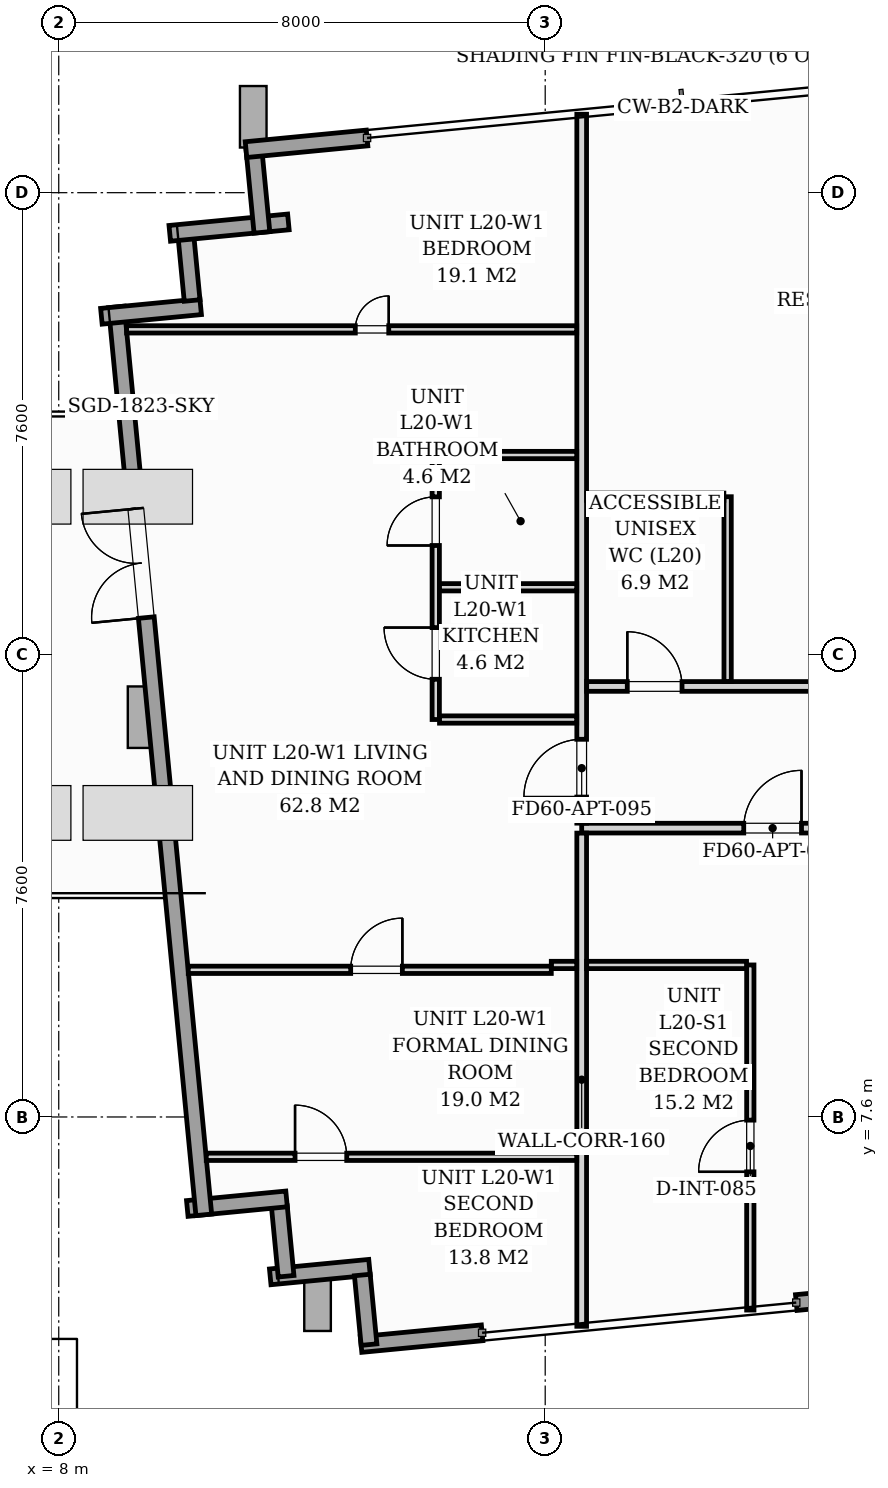
"""IFC4 building model, lengths in metres.
Left out: names, types, materials, properties, quantities, classifications, styles, units other than length and angle.
Written with IfcOpenShell. Run it as: python <this file> out.ifc"""

import sys

from ifc_helpers import new_model, si_unit, direction, frame, frame_2d, origin, origin_2d, place, context, subcontext, project, spatial, rectangle, i_section, extrude, source, transform, mapped, element, fill, save


model = new_model("IFC4")
c1 = context("Model", 3, precision=1e-05, world=origin(), true_north=direction((0.0, 1.0)))
c2 = subcontext(c1, "Body", "Model", "MODEL_VIEW")
j1 = project(units=[si_unit("LENGTHUNIT", "METRE"), si_unit("PLANEANGLEUNIT", "RADIAN")], contexts=[c1])
p1 = place(None, origin())
s1 = spatial("IfcSite", under=j1, at=p1, CompositionType="ELEMENT")
p2 = place(p1, origin())
s2 = spatial("IfcBuilding", under=s1, at=p2, CompositionType="ELEMENT")
p3 = place(p2, frame((0.0, 0.0, 72.6)))
s3 = spatial("IfcBuildingStorey", under=s2, at=p3, CompositionType="ELEMENT", Elevation=72.6)
m1 = source(origin(), c2, "Body", "SweptSolid", [
    extrude(i_section(OverallWidth=0.438, OverallDepth=1.011, WebThickness=0.041, FlangeThickness=0.074, FilletRadius=0.024, at=origin_2d()), origin(), (0.0, 0.0, 1.0), 5.085),
])
p4 = place(p3, frame((11.735, 4.458, 0.108), z_axis=(0.428528444191, 0.106003899258, 0.897288440727), x_axis=(-0.871034557512, -0.215465415974, 0.44144473509)))
e1 = element("IfcColumn", 1, at=p4, inside=s3, PredefinedType="COLUMN", context=c2, shape_type="MappedRepresentation", body=[
    mapped(m1, transform((0.0, 0.0, 0.0), scale=1.0)),
])
m2 = source(origin(), c2, "Body", "SweptSolid", [
    extrude(i_section(OverallWidth=0.438, OverallDepth=1.011, WebThickness=0.041, FlangeThickness=0.074, FilletRadius=0.024, at=origin_2d()), origin(), (0.0, 0.0, 1.0), 5.118),
])
p5 = place(p3, frame((10.871, 24.498, 0.112), z_axis=(0.267775773109, -0.368102238608, 0.890391418011), x_axis=(-0.523786256777, 0.720031134382, 0.455195697181)))
e2 = element("IfcColumn", 2, at=p5, inside=s3, PredefinedType="COLUMN", context=c2, shape_type="MappedRepresentation", body=[
    mapped(m2, transform((0.0, 0.0, 0.0), scale=1.0)),
])
m3 = source(origin(), c2, "Body", "SweptSolid", [
    extrude(i_section(OverallWidth=0.438, OverallDepth=1.011, WebThickness=0.041, FlangeThickness=0.074, FilletRadius=0.024, at=origin_2d()), origin(), (0.0, 0.0, 1.0), 4.984),
])
p6 = place(p3, frame((8.924, 14.364, 0.098), z_axis=(0.359033601049, -0.157741601225, 0.919898070745), x_axis=(-0.842198044788, 0.370020153393, 0.392157544157)))
e3 = element("IfcColumn", 3, at=p6, inside=s3, PredefinedType="COLUMN", context=c2, shape_type="MappedRepresentation", body=[
    mapped(m3, transform((0.0, 0.0, 0.0), scale=1.0)),
])
p7 = place(p3, frame((13.111, 5.128, 0.0), z_axis=(0.0, 0.0, 1.0), x_axis=(-0.995393194909, -0.095876939504, 0.0)))
e4 = element("IfcWall", 4, at=p7, inside=s3, PredefinedType="STANDARD", context=c2, shape_type="SweptSolid", body=[
    extrude(rectangle(XDim=1.64, YDim=0.26, at=frame_2d((0.82, 0.0))), origin(), (0.0, 0.0, 1.0), 4.78),
])
p8 = place(p3, frame((11.739, 4.981, 0.0), z_axis=(0.0, 0.0, 1.0), x_axis=(-0.09576095695, 0.995404359607, 0.0)))
e5 = element("IfcWall", 5, at=p8, inside=s3, PredefinedType="STANDARD", context=c2, shape_type="SweptSolid", body=[
    extrude(rectangle(XDim=1.15, YDim=0.26, at=frame_2d((0.575, 0.0))), origin(), (0.0, 0.0, 1.0), 4.78),
])
p9 = place(p3, frame((11.747, 6.252, 0.0), z_axis=(0.0, 0.0, 1.0), x_axis=(-0.995394563142, -0.095862733462, 0.0)))
e6 = element("IfcWall", 6, at=p9, inside=s3, PredefinedType="STANDARD", context=c2, shape_type="SweptSolid", body=[
    extrude(rectangle(XDim=1.64, YDim=0.26, at=frame_2d((0.82, 0.0))), origin(), (0.0, 0.0, 1.0), 4.78),
])
p10 = place(p3, frame((10.385, 5.991, 0.0), z_axis=(0.0, 0.0, 1.0), x_axis=(-0.095848242264, 0.995395958629, 0.0)))
e7 = element("IfcWall", 7, at=p10, inside=s3, PredefinedType="STANDARD", context=c2, shape_type="SweptSolid", body=[
    extrude(rectangle(XDim=15.0, YDim=0.26, at=frame_2d((7.5, 0.0))), origin(), (0.0, 0.0, 1.0), 4.78),
])
p11 = place(p10, frame((9.867, 0.0, 0.0)))
e8 = element("IfcOpeningElement", 8, at=p11, cuts=e7, PredefinedType="OPENING", context=c2, shape_type="SweptSolid", body=[
    extrude(rectangle(XDim=1.8, YDim=2.1, at=frame_2d((0.9, 1.05))), frame((0.0, 0.14, 0.0), z_axis=(0.0, -1.0, 0.0), x_axis=(1.0, 0.0, 0.0)), (0.0, 0.0, 1.0), 0.28),
])
p12 = place(p3, frame((8.701, 20.767, 0.0), z_axis=(0.0, 0.0, 1.0), x_axis=(0.995394563142, 0.095862733462, 0.0)))
e9 = element("IfcWall", 9, at=p12, inside=s3, PredefinedType="STANDARD", context=c2, shape_type="SweptSolid", body=[
    extrude(rectangle(XDim=1.64, YDim=0.26, at=frame_2d((0.82, 0.0))), origin(), (0.0, 0.0, 1.0), 4.78),
])
p13 = place(p3, frame((10.193, 21.027, 0.0), z_axis=(0.0, 0.0, 1.0), x_axis=(-0.095740721699, 0.995406306092, 0.0)))
e10 = element("IfcWall", 10, at=p13, inside=s3, PredefinedType="STANDARD", context=c2, shape_type="SweptSolid", body=[
    extrude(rectangle(XDim=1.15, YDim=0.26, at=frame_2d((0.575, 0.0))), origin(), (0.0, 0.0, 1.0), 4.78),
])
p14 = place(p3, frame((9.826, 22.131, 0.0), z_axis=(0.0, 0.0, 1.0), x_axis=(0.995400351379, 0.095802612041, 0.0)))
e11 = element("IfcWall", 11, at=p14, inside=s3, PredefinedType="STANDARD", context=c2, shape_type="SweptSolid", body=[
    extrude(rectangle(XDim=1.96, YDim=0.26, at=frame_2d((0.98, 0.0))), origin(), (0.0, 0.0, 1.0), 4.78),
])
p15 = place(p3, frame((11.341, 22.147, 0.0), z_axis=(0.0, 0.0, 1.0), x_axis=(-0.09589913835, 0.995391056452, 0.0)))
e12 = element("IfcWall", 12, at=p15, inside=s3, PredefinedType="STANDARD", context=c2, shape_type="SweptSolid", body=[
    extrude(rectangle(XDim=1.395, YDim=0.26, at=frame_2d((0.698, 0.0))), origin(), (0.0, 0.0, 1.0), 4.78),
])
p16 = place(p3, frame((11.08, 23.508, 0.0), z_axis=(0.0, 0.0, 1.0), x_axis=(0.995398960025, 0.095817067274, 0.0)))
e13 = element("IfcWall", 13, at=p16, inside=s3, PredefinedType="STANDARD", context=c2, shape_type="SweptSolid", body=[
    extrude(rectangle(XDim=2.0, YDim=0.26, at=frame_2d((1.0, 0.0))), origin(), (0.0, 0.0, 1.0), 4.78),
])
p17 = place(p3, frame((28.002, 5.306, 0.0), z_axis=(0.0, 0.0, 1.0), x_axis=(-0.9953942011, -0.09586649267, 0.0)))
e14 = element("IfcWall", 14, at=p17, inside=s3, PredefinedType="STANDARD", context=c2, shape_type="SweptSolid", body=[
    extrude(rectangle(XDim=7.91, YDim=0.26, at=frame_2d((3.955, 0.0))), origin(), (0.0, 0.0, 1.0), 4.78),
])
p18 = place(p3, frame((14.962, 4.051, 0.0), z_axis=(0.0, 0.0, 1.0), x_axis=(-0.995397839199, -0.095828710298, 0.0)))
e15 = element("IfcWall", 15, at=p18, inside=s3, PredefinedType="STANDARD", context=c2, shape_type="SweptSolid", body=[
    extrude(rectangle(XDim=2.0, YDim=0.26, at=frame_2d((1.0, 0.0))), origin(), (0.0, 0.0, 1.0), 4.78),
])
p19 = place(p3, frame((13.103, 3.856, 0.0), z_axis=(0.0, 0.0, 1.0), x_axis=(-0.095951054827, 0.995386053287, 0.0)))
e16 = element("IfcWall", 16, at=p19, inside=s3, PredefinedType="STANDARD", context=c2, shape_type="SweptSolid", body=[
    extrude(rectangle(XDim=1.15, YDim=0.26, at=frame_2d((0.575, 0.0))), origin(), (0.0, 0.0, 1.0), 4.78),
])
p20 = place(p3, frame((16.6, 12.35, 0.0), z_axis=(0.0, 0.0, 1.0), x_axis=(1.0, 0.0, 0.0)))
e17 = element("IfcWall", 17, at=p20, inside=s3, PredefinedType="PARTITIONING", context=c2, shape_type="SweptSolid", body=[
    extrude(rectangle(XDim=37.6, YDim=0.16, at=frame_2d((18.8, 0.0))), origin(), (0.0, 0.0, 1.0), 4.78),
])
p21 = place(p20, frame((2.665, 0.0, 0.0)))
e18 = element("IfcOpeningElement", 18, at=p21, cuts=e17, PredefinedType="OPENING", context=c2, shape_type="SweptSolid", body=[
    extrude(rectangle(XDim=0.95, YDim=2.06, at=frame_2d((0.475, 1.03))), frame((0.0, 0.09, 0.0), z_axis=(0.0, -1.0, 0.0), x_axis=(1.0, 0.0, 0.0)), (0.0, 0.0, 1.0), 0.18),
])
p22 = place(p20, frame((26.146, 0.0, 0.0)))
e19 = element("IfcOpeningElement", 19, at=p22, cuts=e17, PredefinedType="OPENING", context=c2, shape_type="SweptSolid", body=[
    extrude(rectangle(XDim=0.95, YDim=2.06, at=frame_2d((0.475, 1.03))), frame((0.0, 0.09, 0.0), z_axis=(0.0, -1.0, 0.0), x_axis=(1.0, 0.0, 0.0)), (0.0, 0.0, 1.0), 0.18),
])
p23 = place(p3, frame((16.6, 4.158, 0.0), z_axis=(0.0, 0.0, 1.0), x_axis=(0.0, 1.0, 0.0)))
e20 = element("IfcWall", 20, at=p23, inside=s3, PredefinedType="PARTITIONING", context=c2, shape_type="SweptSolid", body=[
    extrude(rectangle(XDim=8.11, YDim=0.16, at=frame_2d((4.055, 0.0))), origin(), (0.0, 0.0, 1.0), 4.78),
])
p24 = place(p3, frame((16.6, 12.432, 0.0), z_axis=(0.0, 0.0, 1.0), x_axis=(0.0, 1.0, 0.0)))
e21 = element("IfcWall", 21, at=p24, inside=s3, PredefinedType="PARTITIONING", context=c2, shape_type="SweptSolid", body=[
    extrude(rectangle(XDim=11.658, YDim=0.16, at=frame_2d((5.829, 0.0))), origin(), (0.0, 0.0, 1.0), 4.78),
])
p25 = place(p24, frame((0.429, 0.0, 0.0)))
e22 = element("IfcOpeningElement", 22, at=p25, cuts=e21, PredefinedType="OPENING", context=c2, shape_type="SweptSolid", body=[
    extrude(rectangle(XDim=0.95, YDim=2.06, at=frame_2d((0.475, 1.03))), frame((0.0, 0.09, 0.0), z_axis=(0.0, -1.0, 0.0), x_axis=(1.0, 0.0, 0.0)), (0.0, 0.0, 1.0), 0.18),
])
p26 = place(p3, frame((19.373, 4.425, 0.0), z_axis=(0.0, 0.0, 1.0), x_axis=(0.0, 1.0, 0.0)))
e23 = element("IfcWall", 23, at=p26, inside=s3, PredefinedType="PARTITIONING", context=c2, shape_type="SweptSolid", body=[
    extrude(rectangle(XDim=5.675, YDim=0.12, at=frame_2d((2.837, 0.0))), origin(), (0.0, 0.0, 1.0), 4.78),
])
p27 = place(p26, frame((2.273, 0.0, 0.0)))
e24 = element("IfcOpeningElement", 24, at=p27, cuts=e23, PredefinedType="OPENING", context=c2, shape_type="SweptSolid", body=[
    extrude(rectangle(XDim=0.85, YDim=2.05, at=frame_2d((0.425, 1.025))), frame((0.0, 0.07, 0.0), z_axis=(0.0, -1.0, 0.0), x_axis=(1.0, 0.0, 0.0)), (0.0, 0.0, 1.0), 0.14),
])
p28 = place(p3, frame((16.1, 10.1, 0.0), z_axis=(0.0, 0.0, 1.0), x_axis=(1.0, 0.0, 0.0)))
e25 = element("IfcWall", 25, at=p28, inside=s3, PredefinedType="PARTITIONING", context=c2, shape_type="SweptSolid", body=[
    extrude(rectangle(XDim=0.418, YDim=0.12, at=frame_2d((0.209, 0.0))), origin(), (0.0, 0.0, 1.0), 4.78),
])
p29 = place(p3, frame((16.682, 10.1, 0.0), z_axis=(0.0, 0.0, 1.0), x_axis=(1.0, 0.0, 0.0)))
e26 = element("IfcWall", 26, at=p29, inside=s3, PredefinedType="PARTITIONING", context=c2, shape_type="SweptSolid", body=[
    extrude(rectangle(XDim=2.629, YDim=0.12, at=frame_2d((1.314, 0.0))), origin(), (0.0, 0.0, 1.0), 4.78),
])
p30 = place(p3, frame((14.2, 14.136, 0.0), z_axis=(0.0, 0.0, 1.0), x_axis=(0.0, 1.0, 0.0)))
e27 = element("IfcWall", 27, at=p30, inside=s3, PredefinedType="PARTITIONING", context=c2, shape_type="SweptSolid", body=[
    extrude(rectangle(XDim=4.35, YDim=0.12, at=frame_2d((2.175, 0.0))), origin(), (0.0, 0.0, 1.0), 4.78),
])
p31 = place(p30, frame((0.662, 0.0, 0.0)))
e28 = element("IfcOpeningElement", 28, at=p31, cuts=e27, PredefinedType="OPENING", context=c2, shape_type="SweptSolid", body=[
    extrude(rectangle(XDim=0.85, YDim=2.05, at=frame_2d((0.425, 1.025))), frame((0.0, 0.07, 0.0), z_axis=(0.0, -1.0, 0.0), x_axis=(1.0, 0.0, 0.0)), (0.0, 0.0, 1.0), 0.14),
])
p32 = place(p30, frame((2.862, 0.0, 0.0)))
e29 = element("IfcOpeningElement", 29, at=p32, cuts=e27, PredefinedType="OPENING", context=c2, shape_type="SweptSolid", body=[
    extrude(rectangle(XDim=0.8, YDim=2.02, at=frame_2d((0.4, 1.01))), frame((0.0, 0.07, 0.0), z_axis=(0.0, -1.0, 0.0), x_axis=(1.0, 0.0, 0.0)), (0.0, 0.0, 1.0), 0.14),
])
for number, where, z_axis, x_axis in (
    (30, (14.262, 16.311, 0.0), (0.0, 0.0, 1.0), (1.0, 0.0, 0.0)),
    (31, (14.262, 14.136, 0.0), (0.0, 0.0, 1.0), (1.0, 0.0, 0.0)),
    (32, (14.262, 18.486, 0.0), (0.0, 0.0, 1.0), (1.0, 0.0, 0.0)),
):
    element("IfcWall", number, at=place(p3, frame(where, z_axis=z_axis, x_axis=x_axis)), inside=s3, PredefinedType="PARTITIONING", context=c2, shape_type="SweptSolid", body=[
        extrude(rectangle(XDim=2.256, YDim=0.12, at=frame_2d((1.128, 0.0))), origin(), (0.0, 0.0, 1.0), 4.78),
    ])
p33 = place(p3, frame((9.116, 20.552, 0.0), z_axis=(0.0, 0.0, 1.0), x_axis=(1.0, 0.0, 0.0)))
e33 = element("IfcWall", 33, at=p33, inside=s3, PredefinedType="PARTITIONING", context=c2, shape_type="SweptSolid", body=[
    extrude(rectangle(XDim=7.402, YDim=0.12, at=frame_2d((3.701, 0.0))), origin(), (0.0, 0.0, 1.0), 4.78),
])
p34 = place(p33, frame((3.761, 0.0, 0.0)))
e34 = element("IfcOpeningElement", 34, at=p34, cuts=e33, PredefinedType="OPENING", context=c2, shape_type="SweptSolid", body=[
    extrude(rectangle(XDim=0.55, YDim=2.0, at=frame_2d((0.275, 1.0))), frame((0.0, 0.07, 0.0), z_axis=(0.0, -1.0, 0.0), x_axis=(1.0, 0.0, 0.0)), (0.0, 0.0, 1.0), 0.14),
])
p35 = place(p3, frame((10.426, 6.945, 0.0), z_axis=(0.0, 0.0, 1.0), x_axis=(1.0, 0.0, 0.0)))
e35 = element("IfcWall", 35, at=p35, inside=s3, PredefinedType="PARTITIONING", context=c2, shape_type="SweptSolid", body=[
    extrude(rectangle(XDim=6.092, YDim=0.12, at=frame_2d((3.046, 0.0))), origin(), (0.0, 0.0, 1.0), 4.78),
])
p36 = place(p35, frame((1.46, 0.0, 0.0)))
e36 = element("IfcOpeningElement", 36, at=p36, cuts=e35, PredefinedType="OPENING", context=c2, shape_type="SweptSolid", body=[
    extrude(rectangle(XDim=0.85, YDim=2.05, at=frame_2d((0.425, 1.025))), frame((0.0, 0.07, 0.0), z_axis=(0.0, -1.0, 0.0), x_axis=(1.0, 0.0, 0.0)), (0.0, 0.0, 1.0), 0.14),
])
p37 = place(p3, frame((10.13, 10.02, 0.0), z_axis=(0.0, 0.0, 1.0), x_axis=(1.0, 0.0, 0.0)))
e37 = element("IfcWall", 37, at=p37, inside=s3, PredefinedType="PARTITIONING", context=c2, shape_type="SweptSolid", body=[
    extrude(rectangle(XDim=5.97, YDim=0.12, at=frame_2d((2.985, 0.0))), origin(), (0.0, 0.0, 1.0), 4.78),
])
p38 = place(p37, frame((2.671, 0.0, 0.0)))
e38 = element("IfcOpeningElement", 38, at=p38, cuts=e37, PredefinedType="OPENING", context=c2, shape_type="SweptSolid", body=[
    extrude(rectangle(XDim=0.85, YDim=2.05, at=frame_2d((0.425, 1.025))), frame((0.0, 0.07, 0.0), z_axis=(0.0, -1.0, 0.0), x_axis=(1.0, 0.0, 0.0)), (0.0, 0.0, 1.0), 0.14),
])
p39 = place(p3, frame((16.682, 14.68, 0.0), z_axis=(0.0, 0.0, 1.0), x_axis=(1.0, 0.0, 0.0)))
e39 = element("IfcWall", 39, at=p39, inside=s3, PredefinedType="PARTITIONING", context=c2, shape_type="SweptSolid", body=[
    extrude(rectangle(XDim=9.478, YDim=0.16, at=frame_2d((4.739, 0.0))), origin(), (0.0, 0.0, 1.0), 4.78),
])
p40 = place(p39, frame((0.668, 0.0, 0.0)))
e40 = element("IfcOpeningElement", 40, at=p40, cuts=e39, PredefinedType="OPENING", context=c2, shape_type="SweptSolid", body=[
    extrude(rectangle(XDim=0.9, YDim=2.05, at=frame_2d((0.45, 1.025))), frame((0.0, 0.09, 0.0), z_axis=(0.0, -1.0, 0.0), x_axis=(1.0, 0.0, 0.0)), (0.0, 0.0, 1.0), 0.18),
])
p41 = place(p39, frame((5.363, 0.0, 0.0)))
e41 = element("IfcOpeningElement", 41, at=p41, cuts=e39, PredefinedType="OPENING", context=c2, shape_type="SweptSolid", body=[
    extrude(rectangle(XDim=0.95, YDim=2.06, at=frame_2d((0.475, 1.03))), frame((0.0, 0.09, 0.0), z_axis=(0.0, -1.0, 0.0), x_axis=(1.0, 0.0, 0.0)), (0.0, 0.0, 1.0), 0.18),
])
p42 = place(p3, frame((19.0, 14.762, 0.0), z_axis=(0.0, 0.0, 1.0), x_axis=(0.0, 1.0, 0.0)))
e42 = element("IfcWall", 42, at=p42, inside=s3, PredefinedType="PARTITIONING", context=c2, shape_type="SweptSolid", body=[
    extrude(rectangle(XDim=3.038, YDim=0.12, at=frame_2d((1.519, 0.0))), origin(), (0.0, 0.0, 1.0), 4.78),
])
p43 = place(p3, frame((16.682, 17.8, 0.0), z_axis=(0.0, 0.0, 1.0), x_axis=(1.0, 0.0, 0.0)))
e43 = element("IfcWall", 43, at=p43, inside=s3, PredefinedType="PARTITIONING", context=c2, shape_type="SweptSolid", body=[
    extrude(rectangle(XDim=2.256, YDim=0.12, at=frame_2d((1.128, 0.0))), origin(), (0.0, 0.0, 1.0), 4.78),
])
m4 = source(origin(), c2, "Body", "SweptSolid", [
    extrude(rectangle(XDim=1.8, YDim=2.1, at=frame_2d((0.9, 1.05))), frame((0.0, 0.025, 0.0), z_axis=(0.0, -1.0, 0.0), x_axis=(1.0, 0.0, 0.0)), (0.0, 0.0, 1.0), 0.05),
])
p44 = place(p11, origin())
e44 = element("IfcDoor", 44, at=p44, inside=s3, OperationType="DOUBLE_DOOR_SINGLE_SWING", PredefinedType="DOOR", context=c2, shape_type="MappedRepresentation", body=[
    mapped(m4, transform((0.0, 0.0, 0.0), scale=1.0)),
])
fill(e8, e44)
m5 = source(origin(), c2, "Body", "SweptSolid", [
    extrude(rectangle(XDim=0.85, YDim=2.05, at=frame_2d((0.425, 1.025))), frame((0.0, 0.025, 0.0), z_axis=(0.0, -1.0, 0.0), x_axis=(1.0, 0.0, 0.0)), (0.0, 0.0, 1.0), 0.05),
])
p45 = place(p27, origin())
e45 = element("IfcDoor", 45, at=p45, inside=s3, OperationType="SINGLE_SWING_LEFT", PredefinedType="DOOR", context=c2, shape_type="MappedRepresentation", body=[
    mapped(m5, transform((0.0, 0.0, 0.0), scale=1.0)),
])
fill(e24, e45)
m6 = source(origin(), c2, "Body", "SweptSolid", [
    extrude(rectangle(XDim=0.95, YDim=2.06, at=frame_2d((0.475, 1.03))), frame((0.0, 0.025, 0.0), z_axis=(0.0, -1.0, 0.0), x_axis=(1.0, 0.0, 0.0)), (0.0, 0.0, 1.0), 0.05),
])
p46 = place(p21, origin())
e46 = element("IfcDoor", 46, at=p46, inside=s3, OperationType="SINGLE_SWING_RIGHT", PredefinedType="DOOR", context=c2, shape_type="MappedRepresentation", body=[
    mapped(m6, transform((0.0, 0.0, 0.0), scale=1.0)),
])
fill(e18, e46)
p47 = place(p25, origin())
e47 = element("IfcDoor", 47, at=p47, inside=s3, OperationType="SINGLE_SWING_LEFT", PredefinedType="DOOR", context=c2, shape_type="MappedRepresentation", body=[
    mapped(m6, transform((0.0, 0.0, 0.0), scale=1.0)),
])
fill(e22, e47)
p48 = place(p31, origin())
e48 = element("IfcDoor", 48, at=p48, inside=s3, OperationType="SINGLE_SWING_RIGHT", PredefinedType="DOOR", context=c2, shape_type="MappedRepresentation", body=[
    mapped(m5, transform((0.0, 0.0, 0.0), scale=1.0)),
])
fill(e28, e48)
m7 = source(origin(), c2, "Body", "SweptSolid", [
    extrude(rectangle(XDim=0.8, YDim=2.02, at=frame_2d((0.4, 1.01))), frame((0.0, 0.025, 0.0), z_axis=(0.0, -1.0, 0.0), x_axis=(1.0, 0.0, 0.0)), (0.0, 0.0, 1.0), 0.05),
])
p49 = place(p32, origin())
e49 = element("IfcDoor", 49, at=p49, inside=s3, OperationType="SINGLE_SWING_LEFT", PredefinedType="DOOR", context=c2, shape_type="MappedRepresentation", body=[
    mapped(m7, transform((0.0, 0.0, 0.0), scale=1.0)),
])
fill(e29, e49)
m8 = source(origin(), c2, "Body", "SweptSolid", [
    extrude(rectangle(XDim=0.55, YDim=2.0, at=frame_2d((0.275, 1.0))), frame((0.0, 0.025, 0.0), z_axis=(0.0, -1.0, 0.0), x_axis=(1.0, 0.0, 0.0)), (0.0, 0.0, 1.0), 0.05),
])
p50 = place(p34, origin())
e50 = element("IfcDoor", 50, at=p50, inside=s3, OperationType="SINGLE_SWING_RIGHT", PredefinedType="DOOR", context=c2, shape_type="MappedRepresentation", body=[
    mapped(m8, transform((0.0, 0.0, 0.0), scale=1.0)),
])
fill(e34, e50)
p51 = place(p36, origin())
e51 = element("IfcDoor", 51, at=p51, inside=s3, OperationType="SINGLE_SWING_LEFT", PredefinedType="DOOR", context=c2, shape_type="MappedRepresentation", body=[
    mapped(m5, transform((0.0, 0.0, 0.0), scale=1.0)),
])
fill(e36, e51)
p52 = place(p38, origin())
e52 = element("IfcDoor", 52, at=p52, inside=s3, OperationType="SINGLE_SWING_RIGHT", PredefinedType="DOOR", context=c2, shape_type="MappedRepresentation", body=[
    mapped(m5, transform((0.0, 0.0, 0.0), scale=1.0)),
])
fill(e38, e52)
m9 = source(origin(), c2, "Body", "SweptSolid", [
    extrude(rectangle(XDim=0.9, YDim=2.05, at=frame_2d((0.45, 1.025))), frame((0.0, 0.025, 0.0), z_axis=(0.0, -1.0, 0.0), x_axis=(1.0, 0.0, 0.0)), (0.0, 0.0, 1.0), 0.05),
])
p53 = place(p40, origin())
e53 = element("IfcDoor", 53, at=p53, inside=s3, OperationType="SINGLE_SWING_LEFT", PredefinedType="DOOR", context=c2, shape_type="MappedRepresentation", body=[
    mapped(m9, transform((0.0, 0.0, 0.0), scale=1.0)),
])
fill(e40, e53)
save(model, sys.argv[1])
